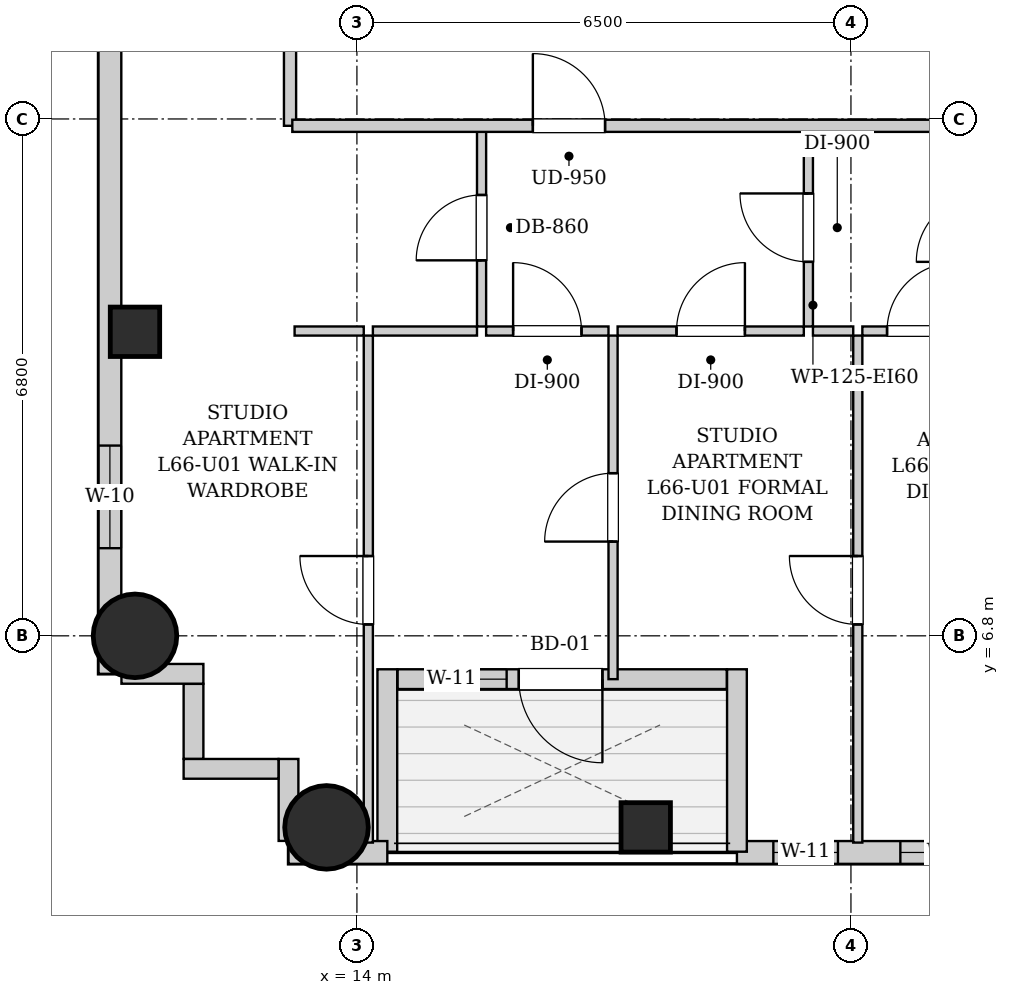
"""IFC4 building model, lengths in metres.
Left out: names, types, materials, properties, quantities, classifications, styles, units other than length and angle.
Written with IfcOpenShell. Run it as: python <this file> out.ifc"""

import sys

from ifc_helpers import new_model, si_unit, direction, frame, frame_2d, origin, origin_2d, place, context, subcontext, project, spatial, rectangle, circle, extrude, element, fill, save


model = new_model("IFC4")
c1 = context("Model", 3, precision=1e-05, world=origin(), true_north=direction((0.0, 1.0)))
c2 = subcontext(c1, "Body", "Model", "MODEL_VIEW")
j1 = project(units=[si_unit("LENGTHUNIT", "METRE"), si_unit("PLANEANGLEUNIT", "RADIAN")], contexts=[c1])
p1 = place(None, origin())
s1 = spatial("IfcSite", under=j1, at=p1, CompositionType="ELEMENT")
p2 = place(p1, origin())
s2 = spatial("IfcBuilding", under=s1, at=p2, CompositionType="ELEMENT")
p3 = place(p2, frame((0.0, 0.0, 227.5)))
s3 = spatial("IfcBuildingStorey", under=s2, at=p3, CompositionType="ELEMENT", Elevation=227.5)
p4 = place(p3, frame((13.6, 4.28, 0.0), z_axis=(0.0, 0.0, 1.0), x_axis=(1.0, 0.0, 0.0)))
e1 = element("IfcColumn", 1, at=p4, inside=s3, PredefinedType="COLUMN", context=c2, shape_type="SweptSolid", body=[
    extrude(circle(Radius=0.55, at=origin_2d()), origin(), (0.0, 0.0, 1.0), 3.4),
])
p5 = place(p3, frame((17.8, 4.28, 0.0), z_axis=(0.0, 0.0, 1.0), x_axis=(1.0, 0.0, 0.0)))
e2 = element("IfcColumn", 2, at=p5, inside=s3, PredefinedType="COLUMN", context=c2, shape_type="SweptSolid", body=[
    extrude(rectangle(XDim=0.65, YDim=0.65, at=origin_2d()), origin(), (0.0, 0.0, 1.0), 3.4),
])
p6 = place(p3, frame((11.08, 6.8, 0.0), z_axis=(0.0, 0.0, 1.0), x_axis=(1.0, 0.0, 0.0)))
e3 = element("IfcColumn", 3, at=p6, inside=s3, PredefinedType="COLUMN", context=c2, shape_type="SweptSolid", body=[
    extrude(circle(Radius=0.55, at=origin_2d()), origin(), (0.0, 0.0, 1.0), 3.4),
])
p7 = place(p3, frame((11.08, 10.8, 0.0), z_axis=(0.0, 0.0, 1.0), x_axis=(1.0, 0.0, 0.0)))
e4 = element("IfcColumn", 4, at=p7, inside=s3, PredefinedType="COLUMN", context=c2, shape_type="SweptSolid", body=[
    extrude(rectangle(XDim=0.65, YDim=0.65, at=origin_2d()), origin(), (0.0, 0.0, 1.0), 3.4),
])
p8 = place(p3, frame((31.5, 3.95, 0.0), z_axis=(0.0, 0.0, 1.0), x_axis=(-1.0, 0.0, 0.0)))
e5 = element("IfcWall", 5, at=p8, inside=s3, PredefinedType="SOLIDWALL", context=c2, shape_type="SweptSolid", body=[
    extrude(rectangle(XDim=12.5, YDim=0.3, at=frame_2d((6.25, 0.0))), origin(), (0.0, 0.0, 1.0), 3.14),
])
p9 = place(p8, frame((11.171, 0.0, 0.55)))
e6 = element("IfcOpeningElement", 6, at=p9, cuts=e5, PredefinedType="OPENING", context=c2, shape_type="SweptSolid", body=[
    extrude(rectangle(XDim=0.85, YDim=1.2, at=frame_2d((0.425, 0.6))), frame((0.0, 0.16, 0.0), z_axis=(0.0, -1.0, 0.0), x_axis=(1.0, 0.0, 0.0)), (0.0, 0.0, 1.0), 0.32),
])
p10 = place(p8, frame((9.0, 0.0, 0.55)))
e7 = element("IfcOpeningElement", 7, at=p10, cuts=e5, PredefinedType="OPENING", context=c2, shape_type="SweptSolid", body=[
    extrude(rectangle(XDim=1.35, YDim=1.2, at=frame_2d((0.675, 0.6))), frame((0.0, 0.16, 0.0), z_axis=(0.0, -1.0, 0.0), x_axis=(1.0, 0.0, 0.0)), (0.0, 0.0, 1.0), 0.32),
])
p11 = place(p8, frame((2.186, 0.0, 0.55)))
e8 = element("IfcOpeningElement", 8, at=p11, cuts=e5, PredefinedType="OPENING", context=c2, shape_type="SweptSolid", body=[
    extrude(rectangle(XDim=1.35, YDim=1.2, at=frame_2d((0.675, 0.6))), frame((0.0, 0.16, 0.0), z_axis=(0.0, -1.0, 0.0), x_axis=(1.0, 0.0, 0.0)), (0.0, 0.0, 1.0), 0.32),
])
p12 = place(p8, frame((0.35, 0.0, 0.55)))
e9 = element("IfcOpeningElement", 9, at=p12, cuts=e5, PredefinedType="OPENING", context=c2, shape_type="SweptSolid", body=[
    extrude(rectangle(XDim=0.68, YDim=1.2, at=frame_2d((0.34, 0.6))), frame((0.0, 0.16, 0.0), z_axis=(0.0, -1.0, 0.0), x_axis=(1.0, 0.0, 0.0)), (0.0, 0.0, 1.0), 0.32),
])
p13 = place(p3, frame((19.0, 3.96, 0.0), z_axis=(0.0, 0.0, 1.0), x_axis=(0.0, 1.0, 0.0)))
e10 = element("IfcWall", 10, at=p13, inside=s3, PredefinedType="SOLIDWALL", context=c2, shape_type="SweptSolid", body=[
    extrude(rectangle(XDim=2.4, YDim=0.26, at=frame_2d((1.2, 0.0))), origin(), (0.0, 0.0, 1.0), 3.14),
])
p14 = place(p3, frame((18.866, 6.23, 0.0), z_axis=(0.0, 0.0, 1.0), x_axis=(-1.0, 0.0, 0.0)))
e11 = element("IfcWall", 11, at=p14, inside=s3, PredefinedType="SOLIDWALL", context=c2, shape_type="SweptSolid", body=[
    extrude(rectangle(XDim=4.332, YDim=0.26, at=frame_2d((2.166, 0.0))), origin(), (0.0, 0.0, 1.0), 3.14),
])
p15 = place(p14, frame((1.636, 0.0, 0.0)))
e12 = element("IfcOpeningElement", 12, at=p15, cuts=e11, PredefinedType="OPENING", context=c2, shape_type="SweptSolid", body=[
    extrude(rectangle(XDim=1.1, YDim=2.0, at=frame_2d((0.55, 1.0))), frame((0.0, 0.14, 0.0), z_axis=(0.0, -1.0, 0.0), x_axis=(1.0, 0.0, 0.0)), (0.0, 0.0, 1.0), 0.28),
])
p16 = place(p14, frame((2.896, 0.0, 0.55)))
e13 = element("IfcOpeningElement", 13, at=p16, cuts=e11, PredefinedType="OPENING", context=c2, shape_type="SweptSolid", body=[
    extrude(rectangle(XDim=0.85, YDim=1.2, at=frame_2d((0.425, 0.6))), frame((0.0, 0.14, 0.0), z_axis=(0.0, -1.0, 0.0), x_axis=(1.0, 0.0, 0.0)), (0.0, 0.0, 1.0), 0.28),
])
p17 = place(p3, frame((14.4, 6.36, 0.0), z_axis=(0.0, 0.0, 1.0), x_axis=(0.0, -1.0, 0.0)))
e14 = element("IfcWall", 14, at=p17, inside=s3, PredefinedType="SOLIDWALL", context=c2, shape_type="SweptSolid", body=[
    extrude(rectangle(XDim=2.4, YDim=0.26, at=frame_2d((1.2, 0.0))), origin(), (0.0, 0.0, 1.0), 3.14),
])
p18 = place(p3, frame((14.4, 3.95, 0.0), z_axis=(0.0, 0.0, 1.0), x_axis=(-1.0, 0.0, 0.0)))
e15 = element("IfcWall", 15, at=p18, inside=s3, PredefinedType="SOLIDWALL", context=c2, shape_type="SweptSolid", body=[
    extrude(rectangle(XDim=1.3, YDim=0.3, at=frame_2d((0.65, 0.0))), origin(), (0.0, 0.0, 1.0), 3.14),
])
p19 = place(p3, frame((10.75, 6.3, 0.0), z_axis=(0.0, 0.0, 1.0), x_axis=(0.0, 1.0, 0.0)))
e16 = element("IfcWall", 16, at=p19, inside=s3, PredefinedType="SOLIDWALL", context=c2, shape_type="SweptSolid", body=[
    extrude(rectangle(XDim=31.4, YDim=0.3, at=frame_2d((15.7, 0.0))), origin(), (0.0, 0.0, 1.0), 3.14),
])
p20 = place(p19, frame((1.653, 0.0, 0.55)))
e17 = element("IfcOpeningElement", 17, at=p20, cuts=e16, PredefinedType="OPENING", context=c2, shape_type="SweptSolid", body=[
    extrude(rectangle(XDim=1.35, YDim=1.2, at=frame_2d((0.675, 0.6))), frame((0.0, 0.16, 0.0), z_axis=(0.0, -1.0, 0.0), x_axis=(1.0, 0.0, 0.0)), (0.0, 0.0, 1.0), 0.32),
])
p21 = place(p19, frame((10.367, 0.0, 0.55)))
e18 = element("IfcOpeningElement", 18, at=p21, cuts=e16, PredefinedType="OPENING", context=c2, shape_type="SweptSolid", body=[
    extrude(rectangle(XDim=1.35, YDim=1.2, at=frame_2d((0.675, 0.6))), frame((0.0, 0.16, 0.0), z_axis=(0.0, -1.0, 0.0), x_axis=(1.0, 0.0, 0.0)), (0.0, 0.0, 1.0), 0.32),
])
p22 = place(p19, frame((19.683, 0.0, 0.55)))
e19 = element("IfcOpeningElement", 19, at=p22, cuts=e16, PredefinedType="OPENING", context=c2, shape_type="SweptSolid", body=[
    extrude(rectangle(XDim=1.35, YDim=1.2, at=frame_2d((0.675, 0.6))), frame((0.0, 0.16, 0.0), z_axis=(0.0, -1.0, 0.0), x_axis=(1.0, 0.0, 0.0)), (0.0, 0.0, 1.0), 0.32),
])
p23 = place(p3, frame((13.1, 4.102, 0.0), z_axis=(0.0, 0.0, 1.0), x_axis=(0.0, 1.0, 0.0)))
e20 = element("IfcWall", 20, at=p23, inside=s3, PredefinedType="SOLIDWALL", context=c2, shape_type="SweptSolid", body=[
    extrude(rectangle(XDim=1.078, YDim=0.26, at=frame_2d((0.539, 0.0))), origin(), (0.0, 0.0, 1.0), 3.14),
])
p24 = place(p3, frame((12.968, 5.05, 0.0), z_axis=(0.0, 0.0, 1.0), x_axis=(-1.0, 0.0, 0.0)))
e21 = element("IfcWall", 21, at=p24, inside=s3, PredefinedType="SOLIDWALL", context=c2, shape_type="SweptSolid", body=[
    extrude(rectangle(XDim=1.248, YDim=0.26, at=frame_2d((0.624, 0.0))), origin(), (0.0, 0.0, 1.0), 3.14),
])
p25 = place(p3, frame((11.85, 5.182, 0.0), z_axis=(0.0, 0.0, 1.0), x_axis=(0.0, 1.0, 0.0)))
e22 = element("IfcWall", 22, at=p25, inside=s3, PredefinedType="SOLIDWALL", context=c2, shape_type="SweptSolid", body=[
    extrude(rectangle(XDim=0.986, YDim=0.26, at=frame_2d((0.493, 0.0))), origin(), (0.0, 0.0, 1.0), 3.14),
])
p26 = place(p3, frame((11.98, 6.3, 0.0), z_axis=(0.0, 0.0, 1.0), x_axis=(-1.0, 0.0, 0.0)))
e23 = element("IfcWall", 23, at=p26, inside=s3, PredefinedType="SOLIDWALL", context=c2, shape_type="SweptSolid", body=[
    extrude(rectangle(XDim=1.078, YDim=0.26, at=frame_2d((0.539, 0.0))), origin(), (0.0, 0.0, 1.0), 3.14),
])
p27 = place(p3, frame((13.12, 13.51, 0.0), z_axis=(0.0, 0.0, 1.0), x_axis=(0.0, 1.0, 0.0)))
e24 = element("IfcWall", 24, at=p27, inside=s3, PredefinedType="PARTITIONING", context=c2, shape_type="SweptSolid", body=[
    extrude(rectangle(XDim=1.58, YDim=0.16, at=frame_2d((0.79, 0.0))), origin(), (0.0, 0.0, 1.0), 3.14),
])
p28 = place(p3, frame((15.64, 10.87, 0.0), z_axis=(0.0, 0.0, 1.0), x_axis=(0.0, 1.0, 0.0)))
e25 = element("IfcWall", 25, at=p28, inside=s3, PredefinedType="PARTITIONING", context=c2, shape_type="SweptSolid", body=[
    extrude(rectangle(XDim=2.6, YDim=0.12, at=frame_2d((1.3, 0.0))), origin(), (0.0, 0.0, 1.0), 3.14),
])
p29 = place(p28, frame((0.87, 0.0, 0.0)))
e26 = element("IfcOpeningElement", 26, at=p29, cuts=e25, PredefinedType="OPENING", context=c2, shape_type="SweptSolid", body=[
    extrude(rectangle(XDim=0.86, YDim=2.05, at=frame_2d((0.43, 1.025))), frame((0.0, 0.07, 0.0), z_axis=(0.0, -1.0, 0.0), x_axis=(1.0, 0.0, 0.0)), (0.0, 0.0, 1.0), 0.14),
])
p30 = place(p3, frame((13.18, 10.81, 0.0), z_axis=(0.0, 0.0, 1.0), x_axis=(1.0, 0.0, 0.0)))
e27 = element("IfcWall", 27, at=p30, inside=s3, PredefinedType="PARTITIONING", context=c2, shape_type="SweptSolid", body=[
    extrude(rectangle(XDim=0.91, YDim=0.12, at=frame_2d((0.455, 0.0))), origin(), (0.0, 0.0, 1.0), 3.14),
])
p31 = place(p3, frame((14.21, 10.81, 0.0), z_axis=(0.0, 0.0, 1.0), x_axis=(1.0, 0.0, 0.0)))
e28 = element("IfcWall", 28, at=p31, inside=s3, PredefinedType="PARTITIONING", context=c2, shape_type="SweptSolid", body=[
    extrude(rectangle(XDim=1.37, YDim=0.12, at=frame_2d((0.685, 0.0))), origin(), (0.0, 0.0, 1.0), 3.14),
])
p32 = place(p3, frame((19.94, 10.87, 0.0), z_axis=(0.0, 0.0, 1.0), x_axis=(0.0, 1.0, 0.0)))
e29 = element("IfcWall", 29, at=p32, inside=s3, PredefinedType="PARTITIONING", context=c2, shape_type="SweptSolid", body=[
    extrude(rectangle(XDim=2.6, YDim=0.12, at=frame_2d((1.3, 0.0))), origin(), (0.0, 0.0, 1.0), 3.14),
])
p33 = place(p32, frame((0.85, 0.0, 0.0)))
e30 = element("IfcOpeningElement", 30, at=p33, cuts=e29, PredefinedType="OPENING", context=c2, shape_type="SweptSolid", body=[
    extrude(rectangle(XDim=0.9, YDim=2.05, at=frame_2d((0.45, 1.025))), frame((0.0, 0.07, 0.0), z_axis=(0.0, -1.0, 0.0), x_axis=(1.0, 0.0, 0.0)), (0.0, 0.0, 1.0), 0.14),
])
p34 = place(p3, frame((15.7, 10.81, 0.0), z_axis=(0.0, 0.0, 1.0), x_axis=(1.0, 0.0, 0.0)))
e31 = element("IfcWall", 31, at=p34, inside=s3, PredefinedType="PARTITIONING", context=c2, shape_type="SweptSolid", body=[
    extrude(rectangle(XDim=1.61, YDim=0.12, at=frame_2d((0.805, 0.0))), origin(), (0.0, 0.0, 1.0), 3.14),
])
p35 = place(p34, frame((0.355, 0.0, 0.0)))
e32 = element("IfcOpeningElement", 32, at=p35, cuts=e31, PredefinedType="OPENING", context=c2, shape_type="SweptSolid", body=[
    extrude(rectangle(XDim=0.9, YDim=2.05, at=frame_2d((0.45, 1.025))), frame((0.0, 0.07, 0.0), z_axis=(0.0, -1.0, 0.0), x_axis=(1.0, 0.0, 0.0)), (0.0, 0.0, 1.0), 0.14),
])
p36 = place(p3, frame((17.43, 10.81, 0.0), z_axis=(0.0, 0.0, 1.0), x_axis=(1.0, 0.0, 0.0)))
e33 = element("IfcWall", 33, at=p36, inside=s3, PredefinedType="PARTITIONING", context=c2, shape_type="SweptSolid", body=[
    extrude(rectangle(XDim=2.45, YDim=0.12, at=frame_2d((1.225, 0.0))), origin(), (0.0, 0.0, 1.0), 3.14),
])
p37 = place(p36, frame((0.775, 0.0, 0.0)))
e34 = element("IfcOpeningElement", 34, at=p37, cuts=e33, PredefinedType="OPENING", context=c2, shape_type="SweptSolid", body=[
    extrude(rectangle(XDim=0.9, YDim=2.05, at=frame_2d((0.45, 1.025))), frame((0.0, 0.07, 0.0), z_axis=(0.0, -1.0, 0.0), x_axis=(1.0, 0.0, 0.0)), (0.0, 0.0, 1.0), 0.14),
])
p38 = place(p3, frame((20.0, 10.81, 0.0), z_axis=(0.0, 0.0, 1.0), x_axis=(1.0, 0.0, 0.0)))
e35 = element("IfcWall", 35, at=p38, inside=s3, PredefinedType="PARTITIONING", context=c2, shape_type="SweptSolid", body=[
    extrude(rectangle(XDim=0.53, YDim=0.12, at=frame_2d((0.265, 0.0))), origin(), (0.0, 0.0, 1.0), 3.14),
])
p39 = place(p3, frame((20.65, 10.81, 0.0), z_axis=(0.0, 0.0, 1.0), x_axis=(1.0, 0.0, 0.0)))
e36 = element("IfcWall", 36, at=p39, inside=s3, PredefinedType="PARTITIONING", context=c2, shape_type="SweptSolid", body=[
    extrude(rectangle(XDim=1.55, YDim=0.12, at=frame_2d((0.775, 0.0))), origin(), (0.0, 0.0, 1.0), 3.14),
])
p40 = place(p39, frame((0.325, 0.0, 0.0)))
e37 = element("IfcOpeningElement", 37, at=p40, cuts=e36, PredefinedType="OPENING", context=c2, shape_type="SweptSolid", body=[
    extrude(rectangle(XDim=0.9, YDim=2.05, at=frame_2d((0.45, 1.025))), frame((0.0, 0.07, 0.0), z_axis=(0.0, -1.0, 0.0), x_axis=(1.0, 0.0, 0.0)), (0.0, 0.0, 1.0), 0.14),
])
p41 = place(p3, frame((14.15, 4.08, 0.0), z_axis=(0.0, 0.0, 1.0), x_axis=(0.0, 1.0, 0.0)))
e38 = element("IfcWall", 38, at=p41, inside=s3, PredefinedType="PARTITIONING", context=c2, shape_type="SweptSolid", body=[
    extrude(rectangle(XDim=6.67, YDim=0.12, at=frame_2d((3.335, 0.0))), origin(), (0.0, 0.0, 1.0), 3.14),
])
p42 = place(p41, frame((2.87, 0.0, 0.0)))
e39 = element("IfcOpeningElement", 39, at=p42, cuts=e38, PredefinedType="OPENING", context=c2, shape_type="SweptSolid", body=[
    extrude(rectangle(XDim=0.9, YDim=2.05, at=frame_2d((0.45, 1.025))), frame((0.0, 0.07, 0.0), z_axis=(0.0, -1.0, 0.0), x_axis=(1.0, 0.0, 0.0)), (0.0, 0.0, 1.0), 0.14),
])
p43 = place(p3, frame((17.37, 6.23, 0.0), z_axis=(0.0, 0.0, 1.0), x_axis=(0.0, 1.0, 0.0)))
e40 = element("IfcWall", 40, at=p43, inside=s3, PredefinedType="PARTITIONING", context=c2, shape_type="SweptSolid", body=[
    extrude(rectangle(XDim=4.52, YDim=0.12, at=frame_2d((2.26, 0.0))), origin(), (0.0, 0.0, 1.0), 3.14),
])
p44 = place(p43, frame((1.81, 0.0, 0.0)))
e41 = element("IfcOpeningElement", 41, at=p44, cuts=e40, PredefinedType="OPENING", context=c2, shape_type="SweptSolid", body=[
    extrude(rectangle(XDim=0.9, YDim=2.05, at=frame_2d((0.45, 1.025))), frame((0.0, 0.07, 0.0), z_axis=(0.0, -1.0, 0.0), x_axis=(1.0, 0.0, 0.0)), (0.0, 0.0, 1.0), 0.14),
])
p45 = place(p3, frame((20.59, 4.08, 0.0), z_axis=(0.0, 0.0, 1.0), x_axis=(0.0, 1.0, 0.0)))
e42 = element("IfcWall", 42, at=p45, inside=s3, PredefinedType="PARTITIONING", context=c2, shape_type="SweptSolid", body=[
    extrude(rectangle(XDim=6.67, YDim=0.12, at=frame_2d((3.335, 0.0))), origin(), (0.0, 0.0, 1.0), 3.14),
])
p46 = place(p45, frame((2.87, 0.0, 0.0)))
e43 = element("IfcOpeningElement", 43, at=p46, cuts=e42, PredefinedType="OPENING", context=c2, shape_type="SweptSolid", body=[
    extrude(rectangle(XDim=0.9, YDim=2.05, at=frame_2d((0.45, 1.025))), frame((0.0, 0.07, 0.0), z_axis=(0.0, -1.0, 0.0), x_axis=(1.0, 0.0, 0.0)), (0.0, 0.0, 1.0), 0.14),
])
p47 = place(p3, frame((13.15, 13.51, 0.0), z_axis=(0.0, 0.0, 1.0), x_axis=(1.0, 0.0, 0.0)))
e44 = element("IfcWall", 44, at=p47, inside=s3, PredefinedType="PARTITIONING", context=c2, shape_type="SweptSolid", body=[
    extrude(rectangle(XDim=24.6, YDim=0.16, at=frame_2d((12.3, 0.0))), origin(), (0.0, 0.0, 1.0), 3.14),
])
p48 = place(p47, frame((3.165, 0.0, 0.0)))
e45 = element("IfcOpeningElement", 45, at=p48, cuts=e44, PredefinedType="OPENING", context=c2, shape_type="SweptSolid", body=[
    extrude(rectangle(XDim=0.95, YDim=2.1, at=frame_2d((0.475, 1.05))), frame((0.0, 0.09, 0.0), z_axis=(0.0, -1.0, 0.0), x_axis=(1.0, 0.0, 0.0)), (0.0, 0.0, 1.0), 0.18),
])
p49 = place(p29, origin())
e46 = element("IfcDoor", 46, at=p49, inside=s3, OperationType="SINGLE_SWING_LEFT", PredefinedType="DOOR", context=c2, shape_type="SweptSolid", body=[
    extrude(rectangle(XDim=0.86, YDim=2.05, at=frame_2d((0.43, 1.025))), frame((0.0, 0.025, 0.0), z_axis=(0.0, -1.0, 0.0), x_axis=(1.0, 0.0, 0.0)), (0.0, 0.0, 1.0), 0.05),
])
fill(e26, e46)
p50 = place(p33, origin())
e47 = element("IfcDoor", 47, at=p50, inside=s3, OperationType="SINGLE_SWING_RIGHT", PredefinedType="DOOR", context=c2, shape_type="SweptSolid", body=[
    extrude(rectangle(XDim=0.9, YDim=2.05, at=frame_2d((0.45, 1.025))), frame((0.0, 0.025, 0.0), z_axis=(0.0, -1.0, 0.0), x_axis=(1.0, 0.0, 0.0)), (0.0, 0.0, 1.0), 0.05),
])
fill(e30, e47)
p51 = place(p35, origin())
e48 = element("IfcDoor", 48, at=p51, inside=s3, OperationType="SINGLE_SWING_LEFT", PredefinedType="DOOR", context=c2, shape_type="SweptSolid", body=[
    extrude(rectangle(XDim=0.9, YDim=2.05, at=frame_2d((0.45, 1.025))), frame((0.0, 0.025, 0.0), z_axis=(0.0, -1.0, 0.0), x_axis=(1.0, 0.0, 0.0)), (0.0, 0.0, 1.0), 0.05),
])
fill(e32, e48)
p52 = place(p37, origin())
e49 = element("IfcDoor", 49, at=p52, inside=s3, OperationType="SINGLE_SWING_RIGHT", PredefinedType="DOOR", context=c2, shape_type="SweptSolid", body=[
    extrude(rectangle(XDim=0.9, YDim=2.05, at=frame_2d((0.45, 1.025))), frame((0.0, 0.025, 0.0), z_axis=(0.0, -1.0, 0.0), x_axis=(1.0, 0.0, 0.0)), (0.0, 0.0, 1.0), 0.05),
])
fill(e34, e49)
p53 = place(p40, origin())
e50 = element("IfcDoor", 50, at=p53, inside=s3, OperationType="SINGLE_SWING_RIGHT", PredefinedType="DOOR", context=c2, shape_type="SweptSolid", body=[
    extrude(rectangle(XDim=0.9, YDim=2.05, at=frame_2d((0.45, 1.025))), frame((0.0, 0.025, 0.0), z_axis=(0.0, -1.0, 0.0), x_axis=(1.0, 0.0, 0.0)), (0.0, 0.0, 1.0), 0.05),
])
fill(e37, e50)
p54 = place(p42, origin())
e51 = element("IfcDoor", 51, at=p54, inside=s3, OperationType="SINGLE_SWING_RIGHT", PredefinedType="DOOR", context=c2, shape_type="SweptSolid", body=[
    extrude(rectangle(XDim=0.9, YDim=2.05, at=frame_2d((0.45, 1.025))), frame((0.0, 0.025, 0.0), z_axis=(0.0, -1.0, 0.0), x_axis=(1.0, 0.0, 0.0)), (0.0, 0.0, 1.0), 0.05),
])
fill(e39, e51)
p55 = place(p44, origin())
e52 = element("IfcDoor", 52, at=p55, inside=s3, OperationType="SINGLE_SWING_LEFT", PredefinedType="DOOR", context=c2, shape_type="SweptSolid", body=[
    extrude(rectangle(XDim=0.9, YDim=2.05, at=frame_2d((0.45, 1.025))), frame((0.0, 0.025, 0.0), z_axis=(0.0, -1.0, 0.0), x_axis=(1.0, 0.0, 0.0)), (0.0, 0.0, 1.0), 0.05),
])
fill(e41, e52)
p56 = place(p46, origin())
e53 = element("IfcDoor", 53, at=p56, inside=s3, OperationType="SINGLE_SWING_RIGHT", PredefinedType="DOOR", context=c2, shape_type="SweptSolid", body=[
    extrude(rectangle(XDim=0.9, YDim=2.05, at=frame_2d((0.45, 1.025))), frame((0.0, 0.025, 0.0), z_axis=(0.0, -1.0, 0.0), x_axis=(1.0, 0.0, 0.0)), (0.0, 0.0, 1.0), 0.05),
])
fill(e43, e53)
p57 = place(p48, origin())
e54 = element("IfcDoor", 54, at=p57, inside=s3, OperationType="SINGLE_SWING_LEFT", PredefinedType="DOOR", context=c2, shape_type="SweptSolid", body=[
    extrude(rectangle(XDim=0.95, YDim=2.1, at=frame_2d((0.475, 1.05))), frame((0.0, 0.025, 0.0), z_axis=(0.0, -1.0, 0.0), x_axis=(1.0, 0.0, 0.0)), (0.0, 0.0, 1.0), 0.05),
])
fill(e45, e54)
p58 = place(p15, origin())
e55 = element("IfcDoor", 55, at=p58, inside=s3, OperationType="SINGLE_SWING_LEFT", PredefinedType="DOOR", context=c2, shape_type="SweptSolid", body=[
    extrude(rectangle(XDim=1.1, YDim=2.0, at=frame_2d((0.55, 1.0))), frame((0.0, 0.025, 0.0), z_axis=(0.0, -1.0, 0.0), x_axis=(1.0, 0.0, 0.0)), (0.0, 0.0, 1.0), 0.05),
])
fill(e12, e55)
p59 = place(p20, origin())
e56 = element("IfcWindow", 56, at=p59, inside=s3, PartitioningType="SINGLE_PANEL", PredefinedType="WINDOW", context=c2, shape_type="SweptSolid", body=[
    extrude(rectangle(XDim=1.35, YDim=1.2, at=frame_2d((0.675, 0.6))), frame((0.0, 0.03, 0.0), z_axis=(0.0, -1.0, 0.0), x_axis=(1.0, 0.0, 0.0)), (0.0, 0.0, 1.0), 0.06),
])
fill(e17, e56)
p60 = place(p16, origin())
e57 = element("IfcWindow", 57, at=p60, inside=s3, PartitioningType="SINGLE_PANEL", PredefinedType="WINDOW", context=c2, shape_type="SweptSolid", body=[
    extrude(rectangle(XDim=0.85, YDim=1.2, at=frame_2d((0.425, 0.6))), frame((0.0, 0.03, 0.0), z_axis=(0.0, -1.0, 0.0), x_axis=(1.0, 0.0, 0.0)), (0.0, 0.0, 1.0), 0.06),
])
fill(e13, e57)
p61 = place(p9, origin())
e58 = element("IfcWindow", 58, at=p61, inside=s3, PartitioningType="SINGLE_PANEL", PredefinedType="WINDOW", context=c2, shape_type="SweptSolid", body=[
    extrude(rectangle(XDim=0.85, YDim=1.2, at=frame_2d((0.425, 0.6))), frame((0.0, 0.03, 0.0), z_axis=(0.0, -1.0, 0.0), x_axis=(1.0, 0.0, 0.0)), (0.0, 0.0, 1.0), 0.06),
])
fill(e6, e58)
p62 = place(p10, origin())
e59 = element("IfcWindow", 59, at=p62, inside=s3, PartitioningType="SINGLE_PANEL", PredefinedType="WINDOW", context=c2, shape_type="SweptSolid", body=[
    extrude(rectangle(XDim=1.35, YDim=1.2, at=frame_2d((0.675, 0.6))), frame((0.0, 0.03, 0.0), z_axis=(0.0, -1.0, 0.0), x_axis=(1.0, 0.0, 0.0)), (0.0, 0.0, 1.0), 0.06),
])
fill(e7, e59)
save(model, sys.argv[1])
